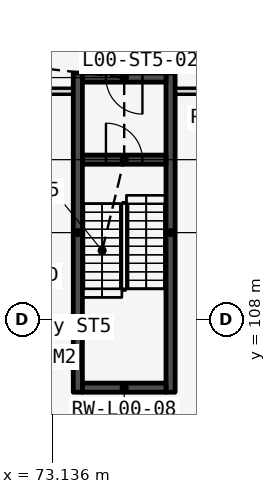
"""IFC4 building model, lengths in metres.
Left out: names, types, materials, properties, quantities, classifications, styles, units other than length and angle.
Written with IfcOpenShell. Run it as: python <this file> out.ifc"""

import sys

from ifc_helpers import new_model, si_unit, direction, frame, frame_2d, origin, place, context, subcontext, project, spatial, rectangle, extrude, element, fill, save


model = new_model("IFC4")
c1 = context("Model", 3, precision=1e-05, world=origin(), true_north=direction((0.0, 1.0)))
c2 = subcontext(c1, "Body", "Model", "MODEL_VIEW")
j1 = project(units=[si_unit("LENGTHUNIT", "METRE"), si_unit("PLANEANGLEUNIT", "RADIAN")], contexts=[c1])
p1 = place(None, origin())
s1 = spatial("IfcSite", under=j1, at=p1, CompositionType="ELEMENT")
p2 = place(p1, origin())
s2 = spatial("IfcBuilding", under=s1, at=p2, CompositionType="ELEMENT")
p3 = place(p2, origin())
s3 = spatial("IfcBuildingStorey", under=s2, at=p3, CompositionType="ELEMENT", Elevation=0.0)
for number, where, z_axis, x_axis in (
    (1, (73.975, 105.6, 0.0), (0.0, 0.0, 1.0), (0.0, 1.0, 0.0)),
    (2, (77.025, 105.6, 0.0), (0.0, 0.0, 1.0), (0.0, 1.0, 0.0)),
):
    element("IfcWall", number, at=place(p3, frame(where, z_axis=z_axis, x_axis=x_axis)), inside=s3, PredefinedType="SOLIDWALL", context=c2, shape_type="SweptSolid", body=[
        extrude(rectangle(XDim=10.5, YDim=0.3, at=frame_2d((5.25, 0.0))), origin(), (0.0, 0.0, 1.0), 7.2),
    ])
p4 = place(p3, frame((74.125, 105.75, 0.0), z_axis=(0.0, 0.0, 1.0), x_axis=(1.0, 0.0, 0.0)))
e3 = element("IfcWall", 3, at=p4, inside=s3, PredefinedType="SOLIDWALL", context=c2, shape_type="SweptSolid", body=[
    extrude(rectangle(XDim=2.75, YDim=0.3, at=frame_2d((1.375, 0.0))), origin(), (0.0, 0.0, 1.0), 7.2),
])
p5 = place(p3, frame((74.125, 113.25, 0.0), z_axis=(0.0, 0.0, 1.0), x_axis=(1.0, 0.0, 0.0)))
e4 = element("IfcWall", 4, at=p5, inside=s3, PredefinedType="SOLIDWALL", context=c2, shape_type="SweptSolid", body=[
    extrude(rectangle(XDim=2.75, YDim=0.3, at=frame_2d((1.375, 0.0))), origin(), (0.0, 0.0, 1.0), 7.2),
])
p6 = place(p5, frame((0.775, 0.0, 0.0)))
e5 = element("IfcOpeningElement", 5, at=p6, cuts=e4, PredefinedType="OPENING", context=c2, shape_type="SweptSolid", body=[
    extrude(rectangle(XDim=1.2, YDim=2.1, at=frame_2d((0.6, 1.05))), frame((0.0, 0.16, 0.0), z_axis=(0.0, -1.0, 0.0), x_axis=(1.0, 0.0, 0.0)), (0.0, 0.0, 1.0), 0.32),
])
p7 = place(p3, frame((74.125, 115.95, 0.0), z_axis=(0.0, 0.0, 1.0), x_axis=(1.0, 0.0, 0.0)))
e6 = element("IfcWall", 6, at=p7, inside=s3, PredefinedType="SOLIDWALL", context=c2, shape_type="SweptSolid", body=[
    extrude(rectangle(XDim=2.75, YDim=0.3, at=frame_2d((1.375, 0.0))), origin(), (0.0, 0.0, 1.0), 7.2),
])
p8 = place(p7, frame((0.775, 0.0, 0.0)))
e7 = element("IfcOpeningElement", 7, at=p8, cuts=e6, PredefinedType="OPENING", context=c2, shape_type="SweptSolid", body=[
    extrude(rectangle(XDim=1.2, YDim=2.1, at=frame_2d((0.6, 1.05))), frame((0.0, 0.16, 0.0), z_axis=(0.0, -1.0, 0.0), x_axis=(1.0, 0.0, 0.0)), (0.0, 0.0, 1.0), 0.32),
])
p9 = place(p3, frame((39.267, 115.5, 0.0), z_axis=(0.0, 0.0, 1.0), x_axis=(1.0, 0.0, 0.0)))
e8 = element("IfcWall", 8, at=p9, inside=s3, PredefinedType="PARTITIONING", context=c2, shape_type="SweptSolid", body=[
    extrude(rectangle(XDim=34.538, YDim=0.2, at=frame_2d((17.269, 0.0))), origin(), (0.0, 0.0, 1.0), 7.2),
])
p10 = place(p9, frame((13.155, 0.0, 0.0)))
e9 = element("IfcOpeningElement", 9, at=p10, cuts=e8, PredefinedType="OPENING", context=c2, shape_type="SweptSolid", body=[
    extrude(rectangle(XDim=1.8, YDim=2.1, at=frame_2d((0.9, 1.05))), frame((0.0, 0.11, 0.0), z_axis=(0.0, -1.0, 0.0), x_axis=(1.0, 0.0, 0.0)), (0.0, 0.0, 1.0), 0.22),
])
p11 = place(p3, frame((77.195, 115.5, 0.0), z_axis=(0.0, 0.0, 1.0), x_axis=(1.0, 0.0, 0.0)))
e10 = element("IfcWall", 10, at=p11, inside=s3, PredefinedType="PARTITIONING", context=c2, shape_type="SweptSolid", body=[
    extrude(rectangle(XDim=43.698, YDim=0.2, at=frame_2d((21.849, 0.0))), origin(), (0.0, 0.0, 1.0), 7.2),
])
p12 = place(p11, frame((20.949, 0.0, 0.0)))
e11 = element("IfcOpeningElement", 11, at=p12, cuts=e10, PredefinedType="OPENING", context=c2, shape_type="SweptSolid", body=[
    extrude(rectangle(XDim=1.8, YDim=2.1, at=frame_2d((0.9, 1.05))), frame((0.0, 0.11, 0.0), z_axis=(0.0, -1.0, 0.0), x_axis=(1.0, 0.0, 0.0)), (0.0, 0.0, 1.0), 0.22),
])
p13 = place(p6, origin())
e12 = element("IfcDoor", 12, at=p13, inside=s3, OperationType="SINGLE_SWING_LEFT", PredefinedType="DOOR", context=c2, shape_type="SweptSolid", body=[
    extrude(rectangle(XDim=1.2, YDim=2.1, at=frame_2d((0.6, 1.05))), frame((0.0, 0.025, 0.0), z_axis=(0.0, -1.0, 0.0), x_axis=(1.0, 0.0, 0.0)), (0.0, 0.0, 1.0), 0.05),
])
fill(e5, e12)
p14 = place(p8, origin())
e13 = element("IfcDoor", 13, at=p14, inside=s3, OperationType="SINGLE_SWING_RIGHT", PredefinedType="DOOR", context=c2, shape_type="SweptSolid", body=[
    extrude(rectangle(XDim=1.2, YDim=2.1, at=frame_2d((0.6, 1.05))), frame((0.0, 0.025, 0.0), z_axis=(0.0, -1.0, 0.0), x_axis=(1.0, 0.0, 0.0)), (0.0, 0.0, 1.0), 0.05),
])
fill(e7, e13)
save(model, sys.argv[1])
